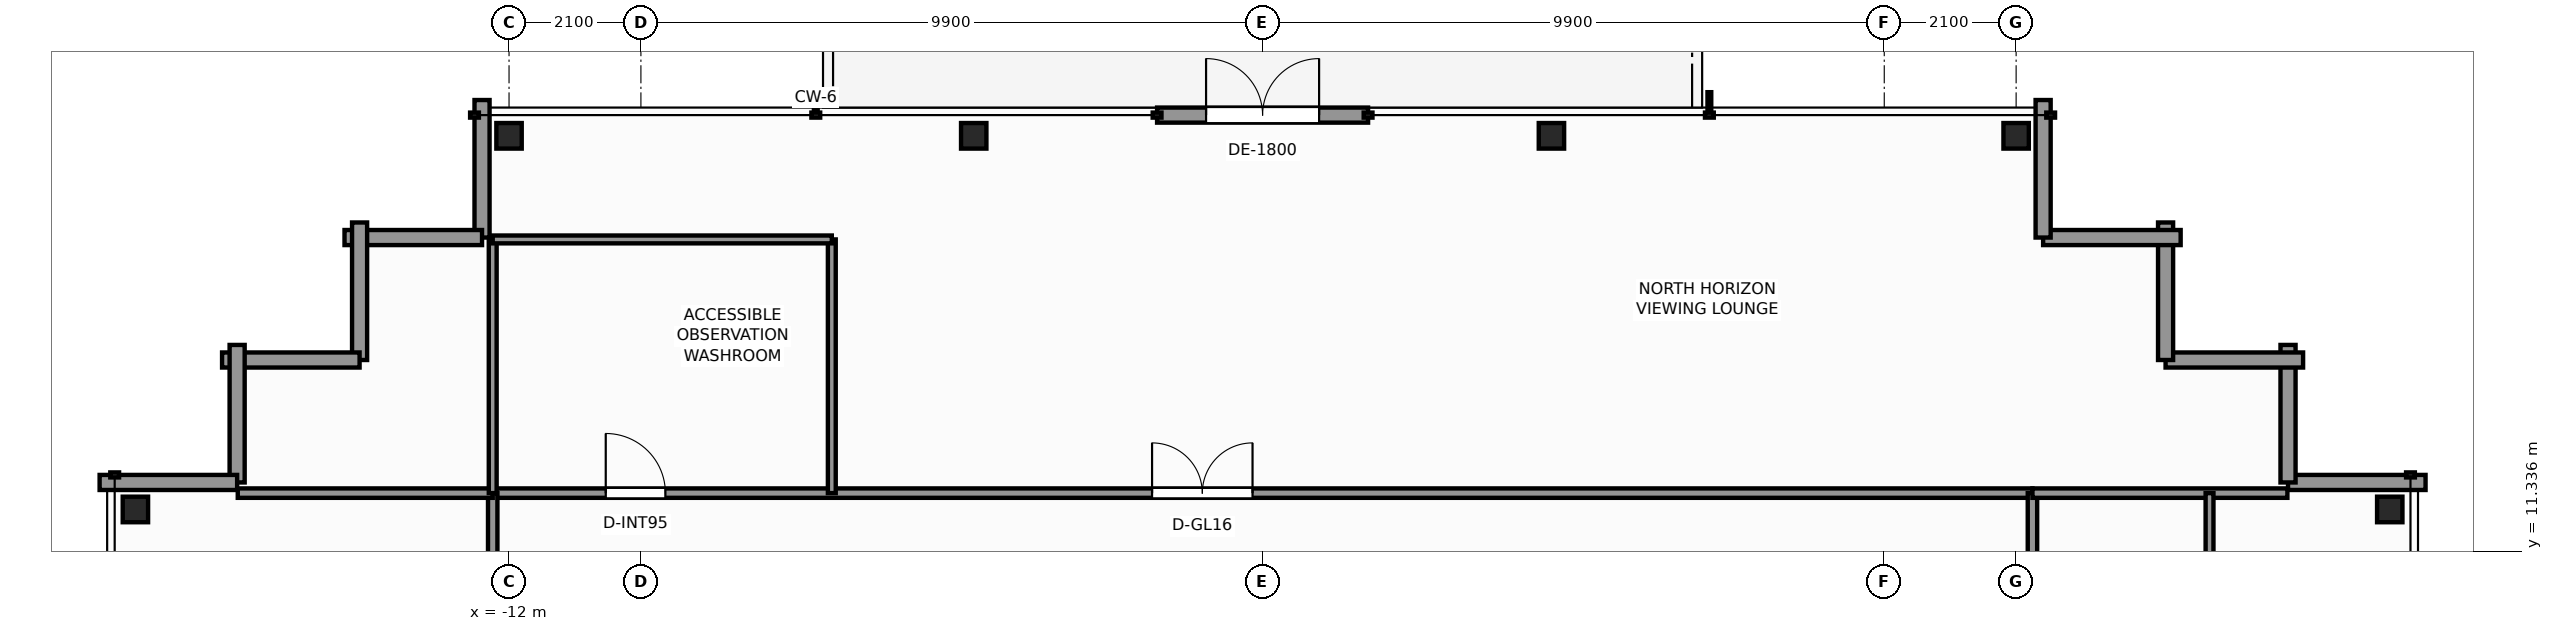
"""IFC4 building model, lengths in metres.
Left out: names, types, materials, properties, quantities, classifications, styles, units other than length and angle.
Written with IfcOpenShell. Run it as: python <this file> out.ifc"""

import sys

from ifc_helpers import new_model, si_unit, direction, frame, frame_2d, origin, origin_2d, place, context, subcontext, project, spatial, rectangle, i_section, extrude, element, fill, save


model = new_model("IFC4")
c1 = context("Model", 3, precision=1e-05, world=origin(), true_north=direction((0.0, 1.0)))
c2 = subcontext(c1, "Body", "Model", "MODEL_VIEW")
j1 = project(units=[si_unit("LENGTHUNIT", "METRE"), si_unit("PLANEANGLEUNIT", "RADIAN")], contexts=[c1])
p1 = place(None, origin())
s1 = spatial("IfcSite", under=j1, at=p1, CompositionType="ELEMENT")
p2 = place(p1, origin())
s2 = spatial("IfcBuilding", under=s1, at=p2, CompositionType="ELEMENT")
p3 = place(p2, frame((0.0, 0.0, 267.4)))
s3 = spatial("IfcBuildingStorey", under=s2, at=p3, CompositionType="ELEMENT", Elevation=267.4)
for number, where, z_axis, x_axis in (
    (1, (-12.0, 17.95, 0.0), (0.0, 0.0, 1.0), (1.0, 0.0, 0.0)),
    (2, (-4.6, 17.95, 0.0), (0.0, 0.0, 1.0), (1.0, 0.0, 0.0)),
    (3, (4.6, 17.95, 0.0), (0.0, 0.0, 1.0), (1.0, 0.0, 0.0)),
    (4, (12.0, 17.95, 0.0), (0.0, 0.0, 1.0), (1.0, 0.0, 0.0)),
    (5, (-17.95, 12.0, 0.0), (0.0, 0.0, 1.0), (1.0, 0.0, 0.0)),
    (6, (17.95, 12.0, 0.0), (0.0, 0.0, 1.0), (1.0, 0.0, 0.0)),
):
    element("IfcColumn", number, at=place(p3, frame(where, z_axis=z_axis, x_axis=x_axis)), inside=s3, PredefinedType="COLUMN", context=c2, shape_type="SweptSolid", body=[
        extrude(i_section(OverallWidth=0.404, OverallDepth=0.407, WebThickness=0.027, FlangeThickness=0.044, FilletRadius=0.025, at=origin_2d()), origin(), (0.0, 0.0, 1.0), 5.0),
    ])
p4 = place(p3, frame((16.33, 12.43, 0.0), z_axis=(0.0, 0.0, 1.0), x_axis=(1.0, 0.0, 0.0)))
e7 = element("IfcWall", 7, at=p4, inside=s3, PredefinedType="STANDARD", context=c2, shape_type="SweptSolid", body=[
    extrude(rectangle(XDim=2.19, YDim=0.24, at=frame_2d((1.095, 0.0))), origin(), (0.0, 0.0, 1.0), 4.083),
])
for number, where, z_axis, x_axis in (
    (8, (16.33, 14.62, 0.0), (0.0, 0.0, 1.0), (0.0, -1.0, 0.0)),
    (9, (14.38, 14.38, 0.0), (0.0, 0.0, 1.0), (1.0, 0.0, 0.0)),
    (10, (14.38, 16.57, 0.0), (0.0, 0.0, 1.0), (0.0, -1.0, 0.0)),
    (11, (12.43, 16.33, 0.0), (0.0, 0.0, 1.0), (1.0, 0.0, 0.0)),
):
    element("IfcWall", number, at=place(p3, frame(where, z_axis=z_axis, x_axis=x_axis)), inside=s3, PredefinedType="STANDARD", context=c2, shape_type="SweptSolid", body=[
        extrude(rectangle(XDim=2.19, YDim=0.24, at=frame_2d((1.095, 0.0))), origin(), (0.0, 0.0, 1.0), 4.083),
    ])
p5 = place(p3, frame((12.43, 18.52, 0.0), z_axis=(0.0, 0.0, 1.0), x_axis=(0.0, -1.0, 0.0)))
e12 = element("IfcWall", 12, at=p5, inside=s3, PredefinedType="STANDARD", context=c2, shape_type="SweptSolid", body=[
    extrude(rectangle(XDim=2.19, YDim=0.24, at=frame_2d((1.095, 0.0))), origin(), (0.0, 0.0, 1.0), 4.083),
])
p6 = place(p3, frame((-1.68, 18.28, 0.0), z_axis=(0.0, 0.0, 1.0), x_axis=(1.0, 0.0, 0.0)))
e13 = element("IfcWall", 13, at=p6, inside=s3, PredefinedType="STANDARD", context=c2, shape_type="SweptSolid", body=[
    extrude(rectangle(XDim=3.36, YDim=0.24, at=frame_2d((1.68, 0.0))), origin(), (0.0, 0.0, 1.0), 4.7),
])
p7 = place(p6, frame((0.78, 0.0, 0.0)))
e14 = element("IfcOpeningElement", 14, at=p7, cuts=e13, PredefinedType="OPENING", context=c2, shape_type="SweptSolid", body=[
    extrude(rectangle(XDim=1.8, YDim=2.3, at=frame_2d((0.9, 1.15))), frame((0.0, 0.13, 0.0), z_axis=(0.0, -1.0, 0.0), x_axis=(1.0, 0.0, 0.0)), (0.0, 0.0, 1.0), 0.26),
])
p8 = place(p3, frame((-12.43, 16.33, 0.0), z_axis=(0.0, 0.0, 1.0), x_axis=(0.0, 1.0, 0.0)))
e15 = element("IfcWall", 15, at=p8, inside=s3, PredefinedType="STANDARD", context=c2, shape_type="SweptSolid", body=[
    extrude(rectangle(XDim=2.19, YDim=0.24, at=frame_2d((1.095, 0.0))), origin(), (0.0, 0.0, 1.0), 4.083),
])
for number, where, z_axis, x_axis in (
    (16, (-14.62, 16.33, 0.0), (0.0, 0.0, 1.0), (1.0, 0.0, 0.0)),
    (17, (-14.38, 14.38, 0.0), (0.0, 0.0, 1.0), (0.0, 1.0, 0.0)),
    (18, (-16.57, 14.38, 0.0), (0.0, 0.0, 1.0), (1.0, 0.0, 0.0)),
    (19, (-16.33, 12.43, 0.0), (0.0, 0.0, 1.0), (0.0, 1.0, 0.0)),
):
    element("IfcWall", number, at=place(p3, frame(where, z_axis=z_axis, x_axis=x_axis)), inside=s3, PredefinedType="STANDARD", context=c2, shape_type="SweptSolid", body=[
        extrude(rectangle(XDim=2.19, YDim=0.24, at=frame_2d((1.095, 0.0))), origin(), (0.0, 0.0, 1.0), 4.083),
    ])
p9 = place(p3, frame((-18.52, 12.43, 0.0), z_axis=(0.0, 0.0, 1.0), x_axis=(1.0, 0.0, 0.0)))
e20 = element("IfcWall", 20, at=p9, inside=s3, PredefinedType="STANDARD", context=c2, shape_type="SweptSolid", body=[
    extrude(rectangle(XDim=2.19, YDim=0.24, at=frame_2d((1.095, 0.0))), origin(), (0.0, 0.0, 1.0), 4.083),
])
p10 = place(p3, frame((-12.26, 12.26, 0.0), z_axis=(0.0, 0.0, 1.0), x_axis=(1.0, 0.0, 0.0)))
e21 = element("IfcWall", 21, at=p10, inside=s3, PredefinedType="PARTITIONING", context=c2, shape_type="SweptSolid", body=[
    extrude(rectangle(XDim=24.52, YDim=0.15, at=frame_2d((12.26, 0.0))), origin(), (0.0, 0.0, 1.0), 3.989),
])
p11 = place(p10, frame((1.8, 0.0, 0.0)))
e22 = element("IfcOpeningElement", 22, at=p11, cuts=e21, PredefinedType="OPENING", context=c2, shape_type="SweptSolid", body=[
    extrude(rectangle(XDim=0.95, YDim=2.06, at=frame_2d((0.475, 1.03))), frame((0.0, 0.085, 0.0), z_axis=(0.0, -1.0, 0.0), x_axis=(1.0, 0.0, 0.0)), (0.0, 0.0, 1.0), 0.17),
])
p12 = place(p10, frame((10.5, 0.0, 0.0)))
e23 = element("IfcOpeningElement", 23, at=p12, cuts=e21, PredefinedType="OPENING", context=c2, shape_type="SweptSolid", body=[
    extrude(rectangle(XDim=1.6, YDim=2.3, at=frame_2d((0.8, 1.15))), frame((0.0, 0.085, 0.0), z_axis=(0.0, -1.0, 0.0), x_axis=(1.0, 0.0, 0.0)), (0.0, 0.0, 1.0), 0.17),
])
p13 = place(p3, frame((-12.26, -12.26, 0.0), z_axis=(0.0, 0.0, 1.0), x_axis=(0.0, 1.0, 0.0)))
e24 = element("IfcWall", 24, at=p13, inside=s3, PredefinedType="PARTITIONING", context=c2, shape_type="SweptSolid", body=[
    extrude(rectangle(XDim=24.52, YDim=0.15, at=frame_2d((12.26, 0.0))), origin(), (0.0, 0.0, 1.0), 3.989),
])
p14 = place(p13, frame((11.5, 0.0, 0.0)))
e25 = element("IfcOpeningElement", 25, at=p14, cuts=e24, PredefinedType="OPENING", context=c2, shape_type="SweptSolid", body=[
    extrude(rectangle(XDim=1.2, YDim=2.2, at=frame_2d((0.6, 1.1))), frame((0.0, 0.085, 0.0), z_axis=(0.0, -1.0, 0.0), x_axis=(1.0, 0.0, 0.0)), (0.0, 0.0, 1.0), 0.17),
])
p15 = place(p3, frame((12.26, -12.26, 0.0), z_axis=(0.0, 0.0, 1.0), x_axis=(0.0, 1.0, 0.0)))
e26 = element("IfcWall", 26, at=p15, inside=s3, PredefinedType="PARTITIONING", context=c2, shape_type="SweptSolid", body=[
    extrude(rectangle(XDim=24.52, YDim=0.15, at=frame_2d((12.26, 0.0))), origin(), (0.0, 0.0, 1.0), 3.989),
])
p16 = place(p15, frame((3.4, 0.0, 0.0)))
e27 = element("IfcOpeningElement", 27, at=p16, cuts=e26, PredefinedType="OPENING", context=c2, shape_type="SweptSolid", body=[
    extrude(rectangle(XDim=0.95, YDim=2.06, at=frame_2d((0.475, 1.03))), frame((0.0, 0.085, 0.0), z_axis=(0.0, -1.0, 0.0), x_axis=(1.0, 0.0, 0.0)), (0.0, 0.0, 1.0), 0.17),
])
p17 = place(p15, frame((20.22, 0.0, 0.0)))
e28 = element("IfcOpeningElement", 28, at=p17, cuts=e26, PredefinedType="OPENING", context=c2, shape_type="SweptSolid", body=[
    extrude(rectangle(XDim=0.95, YDim=2.06, at=frame_2d((0.475, 1.03))), frame((0.0, 0.085, 0.0), z_axis=(0.0, -1.0, 0.0), x_axis=(1.0, 0.0, 0.0)), (0.0, 0.0, 1.0), 0.17),
])
for number, where, z_axis, x_axis in (
    (29, (-16.32, 12.26, 0.0), (0.0, 0.0, 1.0), (1.0, 0.0, 0.0)),
    (30, (12.26, 12.26, 0.0), (0.0, 0.0, 1.0), (1.0, 0.0, 0.0)),
):
    element("IfcWall", number, at=place(p3, frame(where, z_axis=z_axis, x_axis=x_axis)), inside=s3, PredefinedType="PARTITIONING", context=c2, shape_type="SweptSolid", body=[
        extrude(rectangle(XDim=4.06, YDim=0.15, at=frame_2d((2.03, 0.0))), origin(), (0.0, 0.0, 1.0), 4.7),
    ])
p18 = place(p3, frame((15.08, 6.86, 0.0), z_axis=(0.0, 0.0, 1.0), x_axis=(0.0, 1.0, 0.0)))
e31 = element("IfcWall", 31, at=p18, inside=s3, PredefinedType="PARTITIONING", context=c2, shape_type="SweptSolid", body=[
    extrude(rectangle(XDim=5.4, YDim=0.125, at=frame_2d((2.7, 0.0))), origin(), (0.0, 0.0, 1.0), 3.989),
])
p19 = place(p18, frame((1.2, 0.0, 0.0)))
e32 = element("IfcOpeningElement", 32, at=p19, cuts=e31, PredefinedType="OPENING", context=c2, shape_type="SweptSolid", body=[
    extrude(rectangle(XDim=0.9, YDim=2.06, at=frame_2d((0.45, 1.03))), frame((0.0, 0.073, 0.0), z_axis=(0.0, -1.0, 0.0), x_axis=(1.0, 0.0, 0.0)), (0.0, 0.0, 1.0), 0.145),
])
for number, where, z_axis, x_axis in (
    (33, (-12.26, 12.26, 0.0), (0.0, 0.0, 1.0), (0.0, 1.0, 0.0)),
    (34, (-6.86, 12.26, 0.0), (0.0, 0.0, 1.0), (0.0, 1.0, 0.0)),
):
    element("IfcWall", number, at=place(p3, frame(where, z_axis=z_axis, x_axis=x_axis)), inside=s3, PredefinedType="PARTITIONING", context=c2, shape_type="SweptSolid", body=[
        extrude(rectangle(XDim=4.04, YDim=0.125, at=frame_2d((2.02, 0.0))), origin(), (0.0, 0.0, 1.0), 4.7),
    ])
p20 = place(p3, frame((-12.26, 16.3, 0.0), z_axis=(0.0, 0.0, 1.0), x_axis=(1.0, 0.0, 0.0)))
e35 = element("IfcWall", 35, at=p20, inside=s3, PredefinedType="PARTITIONING", context=c2, shape_type="SweptSolid", body=[
    extrude(rectangle(XDim=5.4, YDim=0.125, at=frame_2d((2.7, 0.0))), origin(), (0.0, 0.0, 1.0), 3.989),
])
p21 = place(p7, origin())
e36 = element("IfcDoor", 36, at=p21, inside=s3, OperationType="DOUBLE_DOOR_SINGLE_SWING", PredefinedType="DOOR", context=c2, shape_type="SweptSolid", body=[
    extrude(rectangle(XDim=1.8, YDim=2.3, at=frame_2d((0.9, 1.15))), frame((0.0, 0.025, 0.0), z_axis=(0.0, -1.0, 0.0), x_axis=(1.0, 0.0, 0.0)), (0.0, 0.0, 1.0), 0.05),
])
fill(e14, e36)
p22 = place(p11, origin())
e37 = element("IfcDoor", 37, at=p22, inside=s3, OperationType="SINGLE_SWING_LEFT", PredefinedType="DOOR", context=c2, shape_type="SweptSolid", body=[
    extrude(rectangle(XDim=0.95, YDim=2.06, at=frame_2d((0.475, 1.03))), frame((0.0, 0.025, 0.0), z_axis=(0.0, -1.0, 0.0), x_axis=(1.0, 0.0, 0.0)), (0.0, 0.0, 1.0), 0.05),
])
fill(e22, e37)
p23 = place(p12, origin())
e38 = element("IfcDoor", 38, at=p23, inside=s3, OperationType="DOUBLE_DOOR_SINGLE_SWING", PredefinedType="DOOR", context=c2, shape_type="SweptSolid", body=[
    extrude(rectangle(XDim=1.6, YDim=2.3, at=frame_2d((0.8, 1.15))), frame((0.0, 0.025, 0.0), z_axis=(0.0, -1.0, 0.0), x_axis=(1.0, 0.0, 0.0)), (0.0, 0.0, 1.0), 0.05),
])
fill(e23, e38)
save(model, sys.argv[1])
